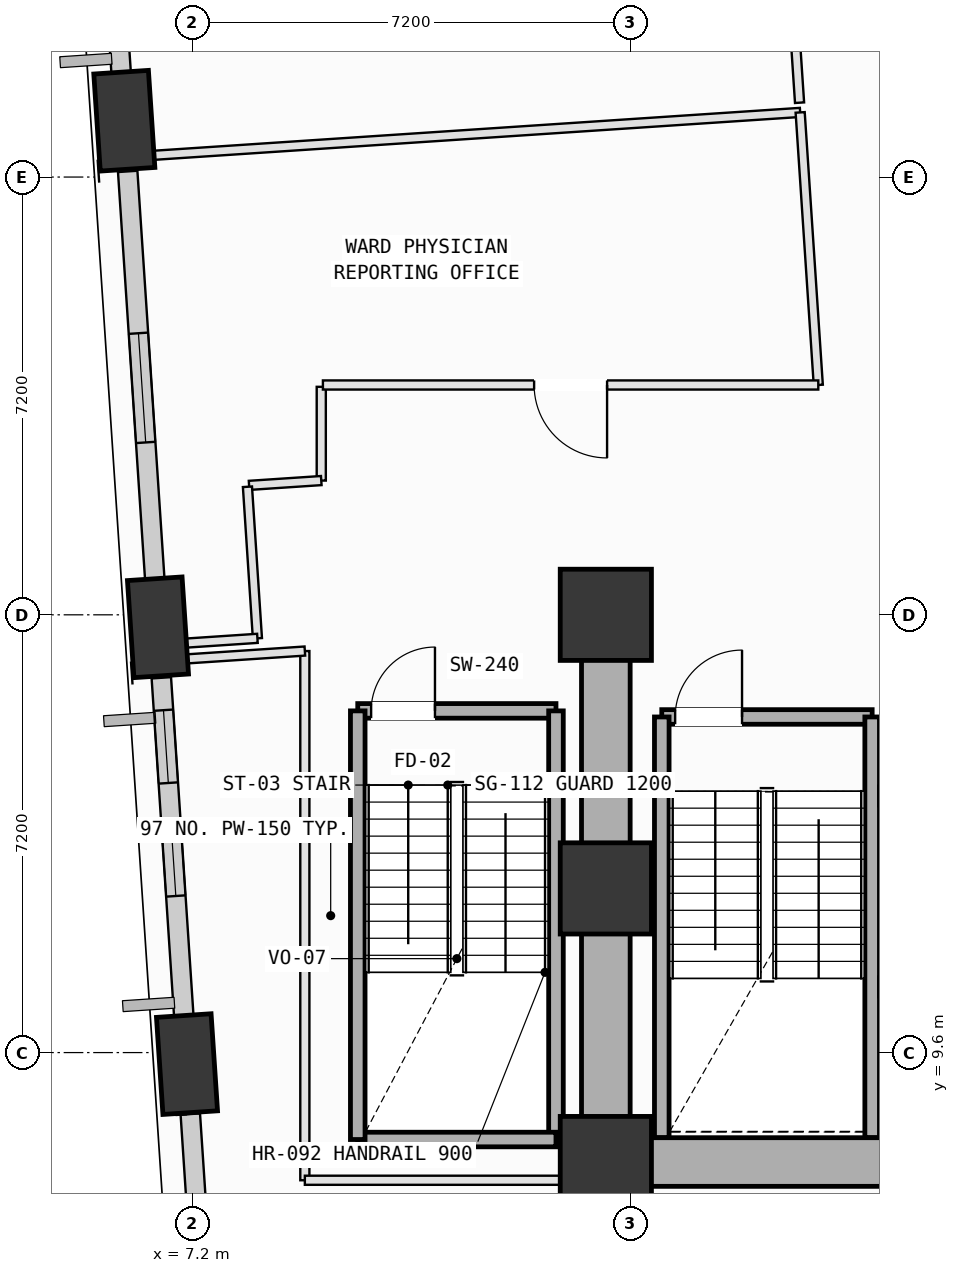
"""IFC4 building model, lengths in metres.
Left out: names, types, materials, properties, quantities, classifications, styles, units other than length and angle.
Written with IfcOpenShell. Run it as: python <this file> out.ifc"""

import sys

from ifc_helpers import new_model, si_unit, direction, frame, frame_2d, origin, origin_2d, place, context, subcontext, project, spatial, rectangle, extrude, element, fill, save


model = new_model("IFC4")
c1 = context("Model", 3, precision=1e-05, world=origin(), true_north=direction((0.0, 1.0)))
c2 = subcontext(c1, "Body", "Model", "MODEL_VIEW")
j1 = project(units=[si_unit("LENGTHUNIT", "METRE"), si_unit("PLANEANGLEUNIT", "RADIAN")], contexts=[c1])
p1 = place(None, origin())
s1 = spatial("IfcSite", under=j1, at=p1, CompositionType="ELEMENT")
p2 = place(p1, origin())
s2 = spatial("IfcBuilding", under=s1, at=p2, CompositionType="ELEMENT")
p3 = place(p2, frame((0.0, 0.0, 39.0)))
s3 = spatial("IfcBuildingStorey", under=s2, at=p3, CompositionType="ELEMENT", Elevation=39.0)
for number, where, z_axis, x_axis in (
    (1, (14.0, 7.8, 0.0), (0.0, 0.0, 1.0), (1.0, 0.0, 0.0)),
    (2, (14.0, 12.3, 0.0), (0.0, 0.0, 1.0), (1.0, 0.0, 0.0)),
    (3, (14.0, 16.8, 0.0), (0.0, 0.0, 1.0), (1.0, 0.0, 0.0)),
):
    element("IfcColumn", number, at=place(p3, frame(where, z_axis=z_axis, x_axis=x_axis)), inside=s3, PredefinedType="COLUMN", context=c2, shape_type="SweptSolid", body=[
        extrude(rectangle(XDim=1.5, YDim=1.5, at=origin_2d()), origin(), (0.0, 0.0, 1.0), 4.0),
    ])
p4 = place(p3, frame((6.081, 24.926, 0.002), z_axis=(0.000424857224, -0.113315491116, 0.993558966025), x_axis=(-0.069990399441, 0.991119146086, 0.113067158127)))
e4 = element("IfcColumn", 4, at=p4, inside=s3, PredefinedType="COLUMN", context=c2, shape_type="SweptSolid", body=[
    extrude(rectangle(XDim=1.6, YDim=0.9, at=origin_2d()), origin(), (0.0, 0.0, 1.0), 4.022),
])
p5 = place(p3, frame((6.635, 16.595, 0.002), z_axis=(0.034705906907, -0.110731258927, 0.993244223906), x_axis=(-0.359645562246, 0.925877045432, 0.115787591296)))
e5 = element("IfcColumn", 5, at=p5, inside=s3, PredefinedType="COLUMN", context=c2, shape_type="SweptSolid", body=[
    extrude(rectangle(XDim=1.6, YDim=0.9, at=origin_2d()), origin(), (0.0, 0.0, 1.0), 4.024),
])
p6 = place(p3, frame((7.112, 9.41, 0.002), z_axis=(0.064176476258, -0.108354617137, 0.992038636768), x_axis=(-0.561458553603, 0.817908679076, 0.125657014444)))
e6 = element("IfcColumn", 6, at=p6, inside=s3, PredefinedType="COLUMN", context=c2, shape_type="SweptSolid", body=[
    extrude(rectangle(XDim=1.6, YDim=0.9, at=origin_2d()), origin(), (0.0, 0.0, 1.0), 4.029),
])
p7 = place(p3, frame((6.056, 25.306, 0.0), z_axis=(0.0, 0.0, 1.0), x_axis=(-0.066265726367, 0.997802011177, 0.0)))
e7 = element("IfcWall", 7, at=p7, inside=s3, PredefinedType="SOLIDWALL", context=c2, shape_type="SweptSolid", body=[
    extrude(rectangle(XDim=5.438, YDim=0.32, at=frame_2d((2.719, 0.0))), origin(), (0.0, 0.0, 1.0), 3.165),
])
p8 = place(p7, frame((2.018, 0.0, 0.75)))
e8 = element("IfcOpeningElement", 8, at=p8, cuts=e7, PredefinedType="OPENING", context=c2, shape_type="SweptSolid", body=[
    extrude(rectangle(XDim=1.4, YDim=1.85, at=frame_2d((0.7, 0.925))), frame((0.0, 0.17, 0.0), z_axis=(0.0, -1.0, 0.0), x_axis=(1.0, 0.0, 0.0)), (0.0, 0.0, 1.0), 0.34),
])
p9 = place(p3, frame((6.609, 16.972, 0.0), z_axis=(0.0, 0.0, 1.0), x_axis=(-0.066266966199, 0.997801928837, 0.0)))
e9 = element("IfcWall", 9, at=p9, inside=s3, PredefinedType="SOLIDWALL", context=c2, shape_type="SweptSolid", body=[
    extrude(rectangle(XDim=7.136, YDim=0.32, at=frame_2d((3.568, 0.0))), origin(), (0.0, 0.0, 1.0), 3.165),
])
p10 = place(p9, frame((2.669, 0.0, 0.75)))
e10 = element("IfcOpeningElement", 10, at=p10, cuts=e9, PredefinedType="OPENING", context=c2, shape_type="SweptSolid", body=[
    extrude(rectangle(XDim=1.8, YDim=2.05, at=frame_2d((0.9, 1.025))), frame((0.0, 0.17, 0.0), z_axis=(0.0, -1.0, 0.0), x_axis=(1.0, 0.0, 0.0)), (0.0, 0.0, 1.0), 0.34),
])
p11 = place(p3, frame((7.087, 9.78, 0.0), z_axis=(0.0, 0.0, 1.0), x_axis=(-0.06627582953, 0.997801340158, 0.0)))
e11 = element("IfcWall", 11, at=p11, inside=s3, PredefinedType="SOLIDWALL", context=c2, shape_type="SweptSolid", body=[
    extrude(rectangle(XDim=5.997, YDim=0.32, at=frame_2d((2.999, 0.0))), origin(), (0.0, 0.0, 1.0), 3.165),
])
p12 = place(p11, frame((2.4, 0.0, 0.75)))
e12 = element("IfcOpeningElement", 12, at=p12, cuts=e11, PredefinedType="OPENING", context=c2, shape_type="SweptSolid", body=[
    extrude(rectangle(XDim=1.2, YDim=1.75, at=frame_2d((0.6, 0.875))), frame((0.0, 0.17, 0.0), z_axis=(0.0, -1.0, 0.0), x_axis=(1.0, 0.0, 0.0)), (0.0, 0.0, 1.0), 0.34),
])
p13 = place(p11, frame((4.263, 0.0, 0.75)))
e13 = element("IfcOpeningElement", 13, at=p13, cuts=e11, PredefinedType="OPENING", context=c2, shape_type="SweptSolid", body=[
    extrude(rectangle(XDim=1.2, YDim=1.75, at=frame_2d((0.6, 0.875))), frame((0.0, 0.17, 0.0), z_axis=(0.0, -1.0, 0.0), x_axis=(1.0, 0.0, 0.0)), (0.0, 0.0, 1.0), 0.34),
])
p14 = place(p3, frame((7.459, 4.182, 0.0), z_axis=(0.0, 0.0, 1.0), x_axis=(-0.066280522608, 0.997801028423, 0.0)))
e14 = element("IfcWall", 14, at=p14, inside=s3, PredefinedType="SOLIDWALL", context=c2, shape_type="SweptSolid", body=[
    extrude(rectangle(XDim=4.417, YDim=0.32, at=frame_2d((2.208, 0.0))), origin(), (0.0, 0.0, 1.0), 3.165),
])
p15 = place(p14, frame((1.411, 0.0, 0.75)))
e15 = element("IfcOpeningElement", 15, at=p15, cuts=e14, PredefinedType="OPENING", context=c2, shape_type="SweptSolid", body=[
    extrude(rectangle(XDim=1.6, YDim=1.95, at=frame_2d((0.8, 0.975))), frame((0.0, 0.17, 0.0), z_axis=(0.0, -1.0, 0.0), x_axis=(1.0, 0.0, 0.0)), (0.0, 0.0, 1.0), 0.34),
])
p16 = place(p3, frame((14.92, 15.12, 0.0), z_axis=(0.0, 0.0, 1.0), x_axis=(1.0, 0.0, 0.0)))
e16 = element("IfcWall", 16, at=p16, inside=s3, PredefinedType="SOLIDWALL", context=c2, shape_type="SweptSolid", body=[
    extrude(rectangle(XDim=3.46, YDim=0.24, at=frame_2d((1.73, 0.0))), origin(), (0.0, 0.0, 1.0), 3.78),
])
p17 = place(p16, frame((0.22, 0.0, 0.0)))
e17 = element("IfcOpeningElement", 17, at=p17, cuts=e16, PredefinedType="OPENING", context=c2, shape_type="SweptSolid", body=[
    extrude(rectangle(XDim=1.1, YDim=2.15, at=frame_2d((0.55, 1.075))), frame((0.0, 0.13, 0.0), z_axis=(0.0, -1.0, 0.0), x_axis=(1.0, 0.0, 0.0)), (0.0, 0.0, 1.0), 0.26),
])
for number, where, z_axis, x_axis in (
    (18, (18.38, 15.12, 0.0), (0.0, 0.0, 1.0), (0.0, -1.0, 0.0)),
    (19, (14.92, 8.2, 0.0), (0.0, 0.0, 1.0), (0.0, 1.0, 0.0)),
):
    element("IfcWall", number, at=place(p3, frame(where, z_axis=z_axis, x_axis=x_axis)), inside=s3, PredefinedType="SOLIDWALL", context=c2, shape_type="SweptSolid", body=[
        extrude(rectangle(XDim=6.92, YDim=0.24, at=frame_2d((3.46, 0.0))), origin(), (0.0, 0.0, 1.0), 3.78),
    ])
p18 = place(p3, frame((9.92, 15.22, 0.0), z_axis=(0.0, 0.0, 1.0), x_axis=(1.0, 0.0, 0.0)))
e20 = element("IfcWall", 20, at=p18, inside=s3, PredefinedType="SOLIDWALL", context=c2, shape_type="SweptSolid", body=[
    extrude(rectangle(XDim=3.26, YDim=0.24, at=frame_2d((1.63, 0.0))), origin(), (0.0, 0.0, 1.0), 3.78),
])
p19 = place(p18, frame((0.22, 0.0, 0.0)))
e21 = element("IfcOpeningElement", 21, at=p19, cuts=e20, PredefinedType="OPENING", context=c2, shape_type="SweptSolid", body=[
    extrude(rectangle(XDim=1.05, YDim=2.15, at=frame_2d((0.525, 1.075))), frame((0.0, 0.13, 0.0), z_axis=(0.0, -1.0, 0.0), x_axis=(1.0, 0.0, 0.0)), (0.0, 0.0, 1.0), 0.26),
])
p20 = place(p3, frame((13.18, 15.22, 0.0), z_axis=(0.0, 0.0, 1.0), x_axis=(0.0, -1.0, 0.0)))
e22 = element("IfcWall", 22, at=p20, inside=s3, PredefinedType="SOLIDWALL", context=c2, shape_type="SweptSolid", body=[
    extrude(rectangle(XDim=7.05, YDim=0.24, at=frame_2d((3.525, 0.0))), origin(), (0.0, 0.0, 1.0), 3.78),
])
p21 = place(p3, frame((13.18, 8.17, 0.0), z_axis=(0.0, 0.0, 1.0), x_axis=(-1.0, 0.0, 0.0)))
e23 = element("IfcWall", 23, at=p21, inside=s3, PredefinedType="SOLIDWALL", context=c2, shape_type="SweptSolid", body=[
    extrude(rectangle(XDim=3.26, YDim=0.24, at=frame_2d((1.63, 0.0))), origin(), (0.0, 0.0, 1.0), 3.78),
])
p22 = place(p3, frame((9.92, 8.17, 0.0), z_axis=(0.0, 0.0, 1.0), x_axis=(0.0, 1.0, 0.0)))
e24 = element("IfcWall", 24, at=p22, inside=s3, PredefinedType="SOLIDWALL", context=c2, shape_type="SweptSolid", body=[
    extrude(rectangle(XDim=7.05, YDim=0.24, at=frame_2d((3.525, 0.0))), origin(), (0.0, 0.0, 1.0), 3.78),
])
p23 = place(p3, frame((14.0, 7.8, 0.0), z_axis=(0.0, 0.0, 1.0), x_axis=(1.0, 0.0, 0.0)))
e25 = element("IfcWall", 25, at=p23, inside=s3, PredefinedType="SHEAR", context=c2, shape_type="SweptSolid", body=[
    extrude(rectangle(XDim=10.8, YDim=0.8, at=frame_2d((5.4, 0.0))), origin(), (0.0, 0.0, 1.0), 3.78),
])
p24 = place(p3, frame((14.0, 16.8, 0.0), z_axis=(0.0, 0.0, 1.0), x_axis=(0.0, -1.0, 0.0)))
e26 = element("IfcWall", 26, at=p24, inside=s3, PredefinedType="SHEAR", context=c2, shape_type="SweptSolid", body=[
    extrude(rectangle(XDim=9.0, YDim=0.8, at=frame_2d((4.5, 0.0))), origin(), (0.0, 0.0, 1.0), 3.78),
])
p25 = place(p3, frame((9.05, 16.204, 0.0), z_axis=(0.0, 0.0, 1.0), x_axis=(0.0, -1.0, 0.0)))
e27 = element("IfcWall", 27, at=p25, inside=s3, PredefinedType="PARTITIONING", context=c2, shape_type="SweptSolid", body=[
    extrude(rectangle(XDim=8.704, YDim=0.15, at=frame_2d((4.352, 0.0))), origin(), (0.0, 0.0, 1.0), 3.78),
])
p26 = place(p3, frame((9.05, 7.5, 0.0), z_axis=(0.0, 0.0, 1.0), x_axis=(1.0, 0.0, 0.0)))
e28 = element("IfcWall", 28, at=p26, inside=s3, PredefinedType="PARTITIONING", context=c2, shape_type="SweptSolid", body=[
    extrude(rectangle(XDim=4.95, YDim=0.15, at=frame_2d((2.475, 0.0))), origin(), (0.0, 0.0, 1.0), 3.78),
])
p27 = place(p3, frame((7.017, 8.579, 0.0), z_axis=(0.0, 0.0, 1.0), x_axis=(-0.067089178032, 0.997746983053, 0.0)))
e29 = element("IfcWall", 29, at=p27, inside=s3, PredefinedType="PARTITIONING", context=c2, shape_type="SweptSolid", body=[
    extrude(rectangle(XDim=1.194, YDim=0.15, at=frame_2d((0.597, 0.0))), origin(), (0.0, 0.0, 1.0), 3.165),
])
p28 = place(p3, frame((6.521, 16.036, 0.0), z_axis=(0.0, 0.0, 1.0), x_axis=(0.997795374901, 0.066365577112, 0.0)))
e30 = element("IfcWall", 30, at=p28, inside=s3, PredefinedType="PARTITIONING", context=c2, shape_type="SweptSolid", body=[
    extrude(rectangle(XDim=2.535, YDim=0.15, at=frame_2d((1.267, 0.0))), origin(), (0.0, 0.0, 1.0), 2.865),
])
p29 = place(p3, frame((9.32, 20.55, 0.0), z_axis=(0.0, 0.0, 1.0), x_axis=(0.0, -1.0, 0.0)))
e31 = element("IfcWall", 31, at=p29, inside=s3, PredefinedType="PARTITIONING", context=c2, shape_type="SweptSolid", body=[
    extrude(rectangle(XDim=1.542, YDim=0.15, at=frame_2d((0.771, 0.0))), origin(), (0.0, 0.0, 1.0), 3.78),
])
p30 = place(p3, frame((9.32, 19.008, 0.0), z_axis=(0.0, 0.0, 1.0), x_axis=(-0.997786973604, -0.066491768706, 0.0)))
e32 = element("IfcWall", 32, at=p30, inside=s3, PredefinedType="PARTITIONING", context=c2, shape_type="SweptSolid", body=[
    extrude(rectangle(XDim=1.19, YDim=0.15, at=frame_2d((0.595, 0.0))), origin(), (0.0, 0.0, 1.0), 3.78),
])
p31 = place(p3, frame((8.106, 18.906, 0.0), z_axis=(0.0, 0.0, 1.0), x_axis=(0.065669322097, -0.997841440378, 0.0)))
e33 = element("IfcWall", 33, at=p31, inside=s3, PredefinedType="PARTITIONING", context=c2, shape_type="SweptSolid", body=[
    extrude(rectangle(XDim=2.498, YDim=0.15, at=frame_2d((1.249, 0.0))), origin(), (0.0, 0.0, 1.0), 3.78),
])
p32 = place(p3, frame((8.27, 16.413, 0.0), z_axis=(0.0, 0.0, 1.0), x_axis=(-0.997785741733, -0.066510251797, 0.0)))
e34 = element("IfcWall", 34, at=p32, inside=s3, PredefinedType="PARTITIONING", context=c2, shape_type="SweptSolid", body=[
    extrude(rectangle(XDim=1.85, YDim=0.15, at=frame_2d((0.925, 0.0))), origin(), (0.0, 0.0, 1.0), 2.865),
])
p33 = place(p3, frame((6.424, 16.29, 0.0), z_axis=(0.0, 0.0, 1.0), x_axis=(-0.066106907325, 0.997812545924, 0.0)))
e35 = element("IfcWall", 35, at=p33, inside=s3, PredefinedType="PARTITIONING", context=c2, shape_type="SweptSolid", body=[
    extrude(rectangle(XDim=0.668, YDim=0.15, at=frame_2d((0.334, 0.0))), origin(), (0.0, 0.0, 1.0), 3.165),
])
p34 = place(p3, frame((5.891, 24.313, 0.0), z_axis=(0.0, 0.0, 1.0), x_axis=(0.997806559187, 0.066197208721, 0.0)))
e36 = element("IfcWall", 36, at=p34, inside=s3, PredefinedType="PARTITIONING", context=c2, shape_type="SweptSolid", body=[
    extrude(rectangle(XDim=11.33, YDim=0.15, at=frame_2d((5.665, 0.0))), origin(), (0.0, 0.0, 1.0), 3.78),
])
p35 = place(p3, frame((17.196, 25.063, 0.0), z_axis=(0.0, 0.0, 1.0), x_axis=(0.066295395341, -0.997800040367, 0.0)))
e37 = element("IfcWall", 37, at=p35, inside=s3, PredefinedType="PARTITIONING", context=c2, shape_type="SweptSolid", body=[
    extrude(rectangle(XDim=4.493, YDim=0.15, at=frame_2d((2.246, 0.0))), origin(), (0.0, 0.0, 1.0), 3.78),
])
p36 = place(p3, frame((17.494, 20.58, 0.0), z_axis=(0.0, 0.0, 1.0), x_axis=(-1.0, 0.0, 0.0)))
e38 = element("IfcWall", 38, at=p36, inside=s3, PredefinedType="PARTITIONING", context=c2, shape_type="SweptSolid", body=[
    extrude(rectangle(XDim=8.147, YDim=0.15, at=frame_2d((4.073, 0.0))), origin(), (0.0, 0.0, 1.0), 3.78),
])
p37 = place(p36, frame((3.473, 0.0, 0.0)))
e39 = element("IfcOpeningElement", 39, at=p37, cuts=e38, PredefinedType="OPENING", context=c2, shape_type="SweptSolid", body=[
    extrude(rectangle(XDim=1.2, YDim=2.15, at=frame_2d((0.6, 1.075))), frame((0.0, 0.085, 0.0), z_axis=(0.0, -1.0, 0.0), x_axis=(1.0, 0.0, 0.0)), (0.0, 0.0, 1.0), 0.17),
])
p38 = place(p3, frame((16.653, 33.245, 0.0), z_axis=(0.0, 0.0, 1.0), x_axis=(0.066289247384, -0.997800448828, 0.0)))
e40 = element("IfcWall", 40, at=p38, inside=s3, PredefinedType="PARTITIONING", context=c2, shape_type="SweptSolid", body=[
    extrude(rectangle(XDim=8.04, YDim=0.15, at=frame_2d((4.02, 0.0))), origin(), (0.0, 0.0, 1.0), 3.78),
])
p39 = place(p38, frame((3.42, 0.0, 0.0)))
e41 = element("IfcOpeningElement", 41, at=p39, cuts=e40, PredefinedType="OPENING", context=c2, shape_type="SweptSolid", body=[
    extrude(rectangle(XDim=1.2, YDim=2.15, at=frame_2d((0.6, 1.075))), frame((0.0, 0.085, 0.0), z_axis=(0.0, -1.0, 0.0), x_axis=(1.0, 0.0, 0.0)), (0.0, 0.0, 1.0), 0.17),
])
p40 = place(p3, frame((5.881, 24.472, 0.0), z_axis=(0.0, 0.0, 1.0), x_axis=(-0.066103977406, 0.997812740032, 0.0)))
e42 = element("IfcWall", 42, at=p40, inside=s3, PredefinedType="PARTITIONING", context=c2, shape_type="SweptSolid", body=[
    extrude(rectangle(XDim=0.82, YDim=0.15, at=frame_2d((0.41, 0.0))), origin(), (0.0, 0.0, 1.0), 3.165),
])
p41 = place(p10, origin())
e43 = element("IfcWindow", 43, at=p41, inside=s3, PartitioningType="SINGLE_PANEL", PredefinedType="WINDOW", context=c2, shape_type="SweptSolid", body=[
    extrude(rectangle(XDim=1.8, YDim=2.05, at=frame_2d((0.9, 1.025))), frame((0.0, 0.03, 0.0), z_axis=(0.0, -1.0, 0.0), x_axis=(1.0, 0.0, 0.0)), (0.0, 0.0, 1.0), 0.06),
])
fill(e10, e43)
p42 = place(p12, origin())
e44 = element("IfcWindow", 44, at=p42, inside=s3, PartitioningType="SINGLE_PANEL", PredefinedType="WINDOW", context=c2, shape_type="SweptSolid", body=[
    extrude(rectangle(XDim=1.2, YDim=1.75, at=frame_2d((0.6, 0.875))), frame((0.0, 0.03, 0.0), z_axis=(0.0, -1.0, 0.0), x_axis=(1.0, 0.0, 0.0)), (0.0, 0.0, 1.0), 0.06),
])
fill(e12, e44)
p43 = place(p13, origin())
e45 = element("IfcWindow", 45, at=p43, inside=s3, PartitioningType="SINGLE_PANEL", PredefinedType="WINDOW", context=c2, shape_type="SweptSolid", body=[
    extrude(rectangle(XDim=1.2, YDim=1.75, at=frame_2d((0.6, 0.875))), frame((0.0, 0.03, 0.0), z_axis=(0.0, -1.0, 0.0), x_axis=(1.0, 0.0, 0.0)), (0.0, 0.0, 1.0), 0.06),
])
fill(e13, e45)
p44 = place(p17, origin())
e46 = element("IfcDoor", 46, at=p44, inside=s3, OperationType="SINGLE_SWING_RIGHT", PredefinedType="DOOR", context=c2, shape_type="SweptSolid", body=[
    extrude(rectangle(XDim=1.1, YDim=2.15, at=frame_2d((0.55, 1.075))), frame((0.0, 0.025, 0.0), z_axis=(0.0, -1.0, 0.0), x_axis=(1.0, 0.0, 0.0)), (0.0, 0.0, 1.0), 0.05),
])
fill(e17, e46)
p45 = place(p19, origin())
e47 = element("IfcDoor", 47, at=p45, inside=s3, OperationType="SINGLE_SWING_RIGHT", PredefinedType="DOOR", context=c2, shape_type="SweptSolid", body=[
    extrude(rectangle(XDim=1.05, YDim=2.15, at=frame_2d((0.525, 1.075))), frame((0.0, 0.025, 0.0), z_axis=(0.0, -1.0, 0.0), x_axis=(1.0, 0.0, 0.0)), (0.0, 0.0, 1.0), 0.05),
])
fill(e21, e47)
p46 = place(p37, origin())
e48 = element("IfcDoor", 48, at=p46, inside=s3, OperationType="SINGLE_SWING_LEFT", PredefinedType="DOOR", context=c2, shape_type="SweptSolid", body=[
    extrude(rectangle(XDim=1.2, YDim=2.15, at=frame_2d((0.6, 1.075))), frame((0.0, 0.025, 0.0), z_axis=(0.0, -1.0, 0.0), x_axis=(1.0, 0.0, 0.0)), (0.0, 0.0, 1.0), 0.05),
])
fill(e39, e48)
save(model, sys.argv[1])
